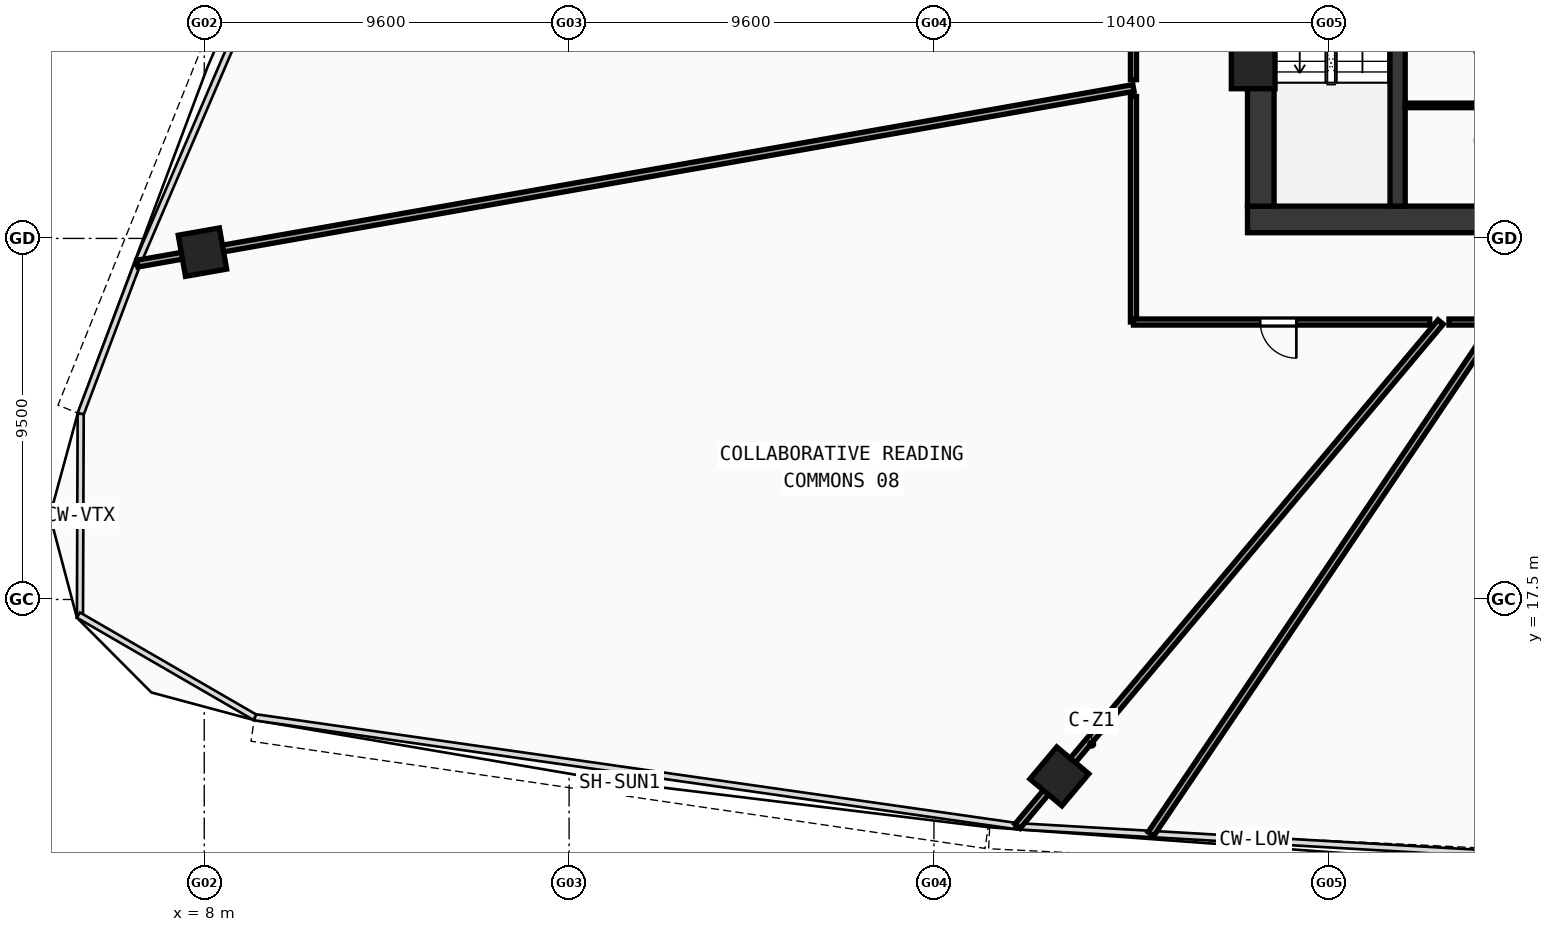
"""IFC4 building model, lengths in metres.
Left out: names, types, materials, properties, quantities, classifications, styles, units other than length and angle.
Written with IfcOpenShell. Run it as: python <this file> out.ifc"""

import sys

from ifc_helpers import new_model, si_unit, direction, frame, frame_2d, origin, origin_with_axes, origin_2d, place, context, subcontext, project, spatial, rectangle, hollow_rectangle, extrude, source, transform, mapped, element, fill, save


model = new_model("IFC4")
c1 = context("Model", 3, precision=1e-05, world=origin(), true_north=direction((0.0, 1.0)))
c2 = subcontext(c1, "Body", "Model", "MODEL_VIEW")
j1 = project(units=[si_unit("LENGTHUNIT", "METRE"), si_unit("PLANEANGLEUNIT", "RADIAN")], contexts=[c1])
p1 = place(None, origin())
s1 = spatial("IfcSite", under=j1, at=p1, CompositionType="ELEMENT")
p2 = place(p1, origin())
s2 = spatial("IfcBuilding", under=s1, at=p2, CompositionType="ELEMENT")
p3 = place(p2, frame((0.0, 0.0, 44.92)))
s3 = spatial("IfcBuildingStorey", under=s2, at=p3, CompositionType="ELEMENT", Elevation=44.92)
p4 = place(p3, frame((35.45, 27.5, 0.0), z_axis=(0.0, 0.0, 1.0), x_axis=(1.0, 0.0, 0.0)))
e1 = element("IfcWall", 1, at=p4, inside=s3, PredefinedType="SHEAR", context=c2, shape_type="SweptSolid", body=[
    extrude(rectangle(XDim=25.1, YDim=0.7, at=frame_2d((12.55, 0.0))), origin(), (0.0, 0.0, 1.0), 3.37),
])
p5 = place(p3, frame((35.8, 27.85, 0.0), z_axis=(0.0, 0.0, 1.0), x_axis=(0.0, 1.0, 0.0)))
e2 = element("IfcWall", 2, at=p5, inside=s3, PredefinedType="SHEAR", context=c2, shape_type="SweptSolid", body=[
    extrude(rectangle(XDim=12.0, YDim=0.7, at=frame_2d((6.0, 0.0))), origin(), (0.0, 0.0, 1.0), 3.37),
])
p6 = place(p3, frame((39.4, 27.85, 0.0), z_axis=(0.0, 0.0, 1.0), x_axis=(0.0, 1.0, 0.0)))
e3 = element("IfcWall", 3, at=p6, inside=s3, PredefinedType="SHEAR", context=c2, shape_type="SweptSolid", body=[
    extrude(rectangle(XDim=12.0, YDim=0.4, at=frame_2d((6.0, 0.0))), origin(), (0.0, 0.0, 1.0), 3.37),
])
p7 = place(p6, frame((9.9, 0.0, 0.0)))
e4 = element("IfcOpeningElement", 4, at=p7, cuts=e3, PredefinedType="OPENING", context=c2, shape_type="SweptSolid", body=[
    extrude(rectangle(XDim=1.1, YDim=2.1, at=frame_2d((0.55, 1.05))), frame((0.0, 0.21, 0.0), z_axis=(0.0, -1.0, 0.0), x_axis=(1.0, 0.0, 0.0)), (0.0, 0.0, 1.0), 0.42),
])
m1 = source(origin(), c2, "Body", "SweptSolid", [
    extrude(hollow_rectangle(XDim=1.15, YDim=1.15, WallThickness=0.048, at=origin_2d()), origin(), (0.0, 0.0, 1.0), 3.63),
])
p8 = place(p3, frame((35.6, 31.513, -0.26), z_axis=(0.0, 0.0, 1.0), x_axis=(1.0, 0.0, 0.0)))
e5 = element("IfcColumn", 5, at=p8, inside=s3, PredefinedType="COLUMN", context=c2, shape_type="MappedRepresentation", body=[
    mapped(m1, transform((0.0, 0.0, 0.0), scale=1.0)),
])
m2 = source(origin(), c2, "Body", "SweptSolid", [
    extrude(hollow_rectangle(XDim=1.1, YDim=1.1, WallThickness=0.045, at=origin_2d()), origin(), (0.0, 0.0, 1.0), 3.63),
])
for number, where, z_axis, x_axis in (
    (6, (30.5, 12.844, -0.26), (0.0, 0.0, 1.0), (0.766, -0.643, 0.0)),
    (7, (7.952, 26.638, -0.26), (0.0, 0.0, 1.0), (0.174, -0.985, 0.0)),
):
    element("IfcColumn", number, at=place(p3, frame(where, z_axis=z_axis, x_axis=x_axis)), inside=s3, PredefinedType="COLUMN", context=c2, shape_type="MappedRepresentation", body=[
        mapped(m2, transform((0.0, 0.0, 0.0), scale=1.0)),
    ])
p9 = place(p3, frame((39.6, 30.5, 0.0), z_axis=(0.0, 0.0, 1.0), x_axis=(1.0, 0.0, 0.0)))
e8 = element("IfcWall", 8, at=p9, inside=s3, PredefinedType="PARTITIONING", context=c2, shape_type="SweptSolid", body=[
    extrude(rectangle(XDim=2.72, YDim=0.12, at=frame_2d((1.36, 0.0))), origin(), (0.0, 0.0, 1.0), 3.37),
])
p10 = place(p3, frame((32.45, 30.958, 0.0), z_axis=(0.0, 0.0, 1.0), x_axis=(-0.984808390998, -0.173644559431, 0.0)))
e9 = element("IfcWall", 9, at=p10, inside=s3, PredefinedType="PARTITIONING", context=c2, shape_type="SweptSolid", body=[
    extrude(rectangle(XDim=26.614, YDim=0.18, at=frame_2d((13.307, 0.0))), origin(), (0.0, 0.0, 1.0), 2.67),
])
p11 = place(p3, frame((40.532, 24.8, 0.0), z_axis=(0.0, 0.0, 1.0), x_axis=(-0.642784696521, -0.766046887546, 0.0)))
e10 = element("IfcWall", 10, at=p11, inside=s3, PredefinedType="PARTITIONING", context=c2, shape_type="SweptSolid", body=[
    extrude(rectangle(XDim=17.319, YDim=0.18, at=frame_2d((8.659, 0.0))), origin(), (0.0, 0.0, 1.0), 2.67),
])
p12 = place(p3, frame((41.997, 24.8, 0.0), z_axis=(0.0, 0.0, 1.0), x_axis=(-0.559182499599, -0.82904458996, 0.0)))
e11 = element("IfcWall", 11, at=p12, inside=s3, PredefinedType="PARTITIONING", context=c2, shape_type="SweptSolid", body=[
    extrude(rectangle(XDim=16.248, YDim=0.18, at=frame_2d((8.124, 0.0))), origin(), (0.0, 0.0, 1.0), 2.67),
])
p13 = place(p3, frame((32.45, 24.8, 0.0), z_axis=(0.0, 0.0, 1.0), x_axis=(0.0, 1.0, 0.0)))
e12 = element("IfcWall", 12, at=p13, inside=s3, PredefinedType="PARTITIONING", context=c2, shape_type="SweptSolid", body=[
    extrude(rectangle(XDim=5.935, YDim=0.16, at=frame_2d((2.967, 0.0))), origin(), (0.0, 0.0, 1.0), 2.97),
])
p14 = place(p3, frame((32.45, 31.178, 0.0), z_axis=(0.0, 0.0, 1.0), x_axis=(0.0, 1.0, 0.0)))
e13 = element("IfcWall", 13, at=p14, inside=s3, PredefinedType="PARTITIONING", context=c2, shape_type="SweptSolid", body=[
    extrude(rectangle(XDim=7.355, YDim=0.16, at=frame_2d((3.677, 0.0))), origin(), (0.0, 0.0, 1.0), 3.37),
])
p15 = place(p14, frame((3.202, 0.0, 0.0)))
e14 = element("IfcOpeningElement", 14, at=p15, cuts=e13, PredefinedType="OPENING", context=c2, shape_type="SweptSolid", body=[
    extrude(rectangle(XDim=0.95, YDim=2.1, at=frame_2d((0.475, 1.05))), frame((0.0, 0.09, 0.0), z_axis=(0.0, -1.0, 0.0), x_axis=(1.0, 0.0, 0.0)), (0.0, 0.0, 1.0), 0.18),
])
p16 = place(p3, frame((41.731, 24.8, 0.0), z_axis=(0.0, 0.0, 1.0), x_axis=(-1.0, 0.0, 0.0)))
e15 = element("IfcWall", 15, at=p16, inside=s3, PredefinedType="PARTITIONING", context=c2, shape_type="SweptSolid", body=[
    extrude(rectangle(XDim=0.979, YDim=0.16, at=frame_2d((0.49, 0.0))), origin(), (0.0, 0.0, 1.0), 2.67),
])
p17 = place(p3, frame((40.245, 24.8, 0.0), z_axis=(0.0, 0.0, 1.0), x_axis=(-1.0, 0.0, 0.0)))
e16 = element("IfcWall", 16, at=p17, inside=s3, PredefinedType="PARTITIONING", context=c2, shape_type="SweptSolid", body=[
    extrude(rectangle(XDim=7.795, YDim=0.16, at=frame_2d((3.897, 0.0))), origin(), (0.0, 0.0, 1.0), 2.97),
])
p18 = place(p17, frame((3.509, 0.0, 0.0)))
e17 = element("IfcOpeningElement", 17, at=p18, cuts=e16, PredefinedType="OPENING", context=c2, shape_type="SweptSolid", body=[
    extrude(rectangle(XDim=0.95, YDim=2.1, at=frame_2d((0.475, 1.05))), frame((0.0, 0.09, 0.0), z_axis=(0.0, -1.0, 0.0), x_axis=(1.0, 0.0, 0.0)), (0.0, 0.0, 1.0), 0.18),
])
m3 = source(origin(), c2, "Body", "SweptSolid", [
    extrude(rectangle(XDim=0.95, YDim=2.1, at=frame_2d((0.475, 1.05))), frame((0.0, 0.025, 0.0), z_axis=(0.0, -1.0, 0.0), x_axis=(1.0, 0.0, 0.0)), (0.0, 0.0, 1.0), 0.05),
])
p19 = place(p18, origin_with_axes())
e18 = element("IfcDoor", 18, at=p19, inside=s3, OperationType="SINGLE_SWING_LEFT", PredefinedType="DOOR", context=c2, shape_type="MappedRepresentation", body=[
    mapped(m3, transform((0.0, 0.0, 0.0), scale=1.0)),
])
fill(e17, e18)
save(model, sys.argv[1])
